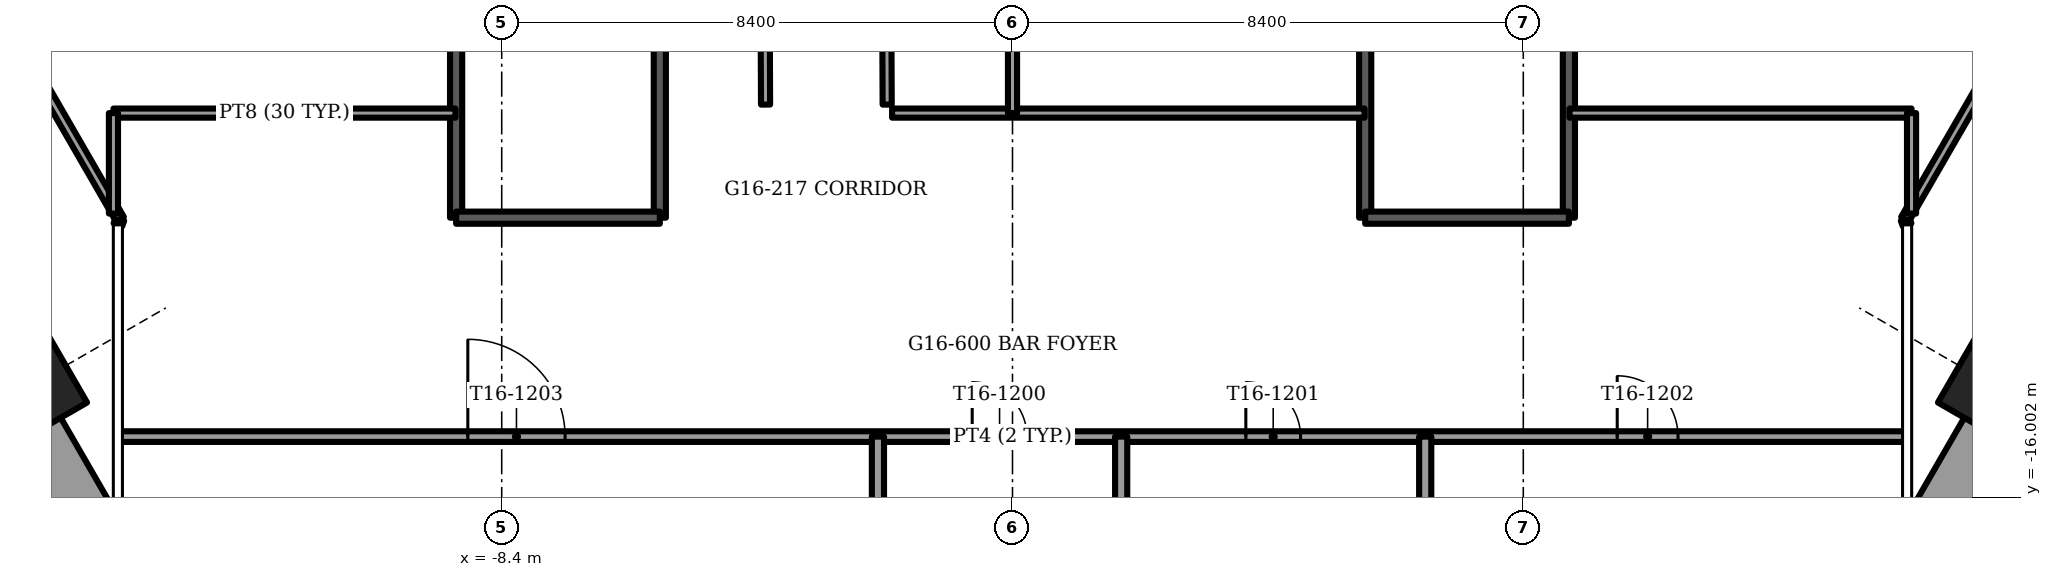
"""IFC4 building model, lengths in metres.
Left out: names, types, materials, properties, quantities, classifications, styles, units other than length and angle.
Written with IfcOpenShell. Run it as: python <this file> out.ifc"""

import sys

from ifc_helpers import new_model, si_unit, direction, frame, frame_2d, origin, origin_2d, place, context, subcontext, project, spatial, rectangle, extrude, element, fill, save


model = new_model("IFC4")
c1 = context("Model", 3, precision=1e-05, world=origin(), true_north=direction((0.0, 1.0)))
c2 = subcontext(c1, "Body", "Model", "MODEL_VIEW")
j1 = project(units=[si_unit("LENGTHUNIT", "METRE"), si_unit("PLANEANGLEUNIT", "RADIAN")], contexts=[c1])
p1 = place(None, origin())
s1 = spatial("IfcSite", under=j1, at=p1, CompositionType="ELEMENT")
p2 = place(p1, origin())
s2 = spatial("IfcBuilding", under=s1, at=p2, CompositionType="ELEMENT")
p3 = place(p2, frame((0.0, 0.0, 65.5)))
s3 = spatial("IfcBuildingStorey", under=s2, at=p3, CompositionType="ELEMENT", Elevation=65.5)
for number, where, z_axis, x_axis in (
    (1, (-16.175, -14.183, -1.2), (0.0, 0.0, 1.0), (-0.5, 0.866, 0.0)),
    (2, (16.175, -14.183, -1.2), (0.0, 0.0, 1.0), (-0.5, -0.866, 0.0)),
):
    element("IfcColumn", number, at=place(p3, frame(where, z_axis=z_axis, x_axis=x_axis)), inside=s3, PredefinedType="COLUMN", context=c2, shape_type="SweptSolid", body=[
        extrude(rectangle(XDim=1.4, YDim=1.4, at=origin_2d()), origin(), (0.0, 0.0, 1.0), 3.75),
    ])
for number, where, z_axis, x_axis in (
    (3, (-16.057, -14.889, 0.0), (0.0, 0.0, 1.0), (0.5, -0.866, 0.0)),
    (4, (13.177, -19.876, 0.0), (0.0, 0.0, 1.0), (0.5, 0.866, 0.0)),
):
    element("IfcWall", number, at=place(p3, frame(where, z_axis=z_axis, x_axis=x_axis)), inside=s3, PredefinedType="PARAPET", context=c2, shape_type="SweptSolid", body=[
        extrude(rectangle(XDim=5.759, YDim=0.9, at=frame_2d((2.879, 0.0))), origin(), (0.0, 0.0, 1.0), 1.1),
    ])
p4 = place(p3, frame((-20.496, -1.351, 0.0), z_axis=(0.0, 0.0, 1.0), x_axis=(0.500010091595, -0.866019577321, 0.0)))
e5 = element("IfcWall", 5, at=p4, inside=s3, PredefinedType="SOLIDWALL", context=c2, shape_type="SweptSolid", body=[
    extrude(rectangle(XDim=11.633, YDim=0.15, at=frame_2d((5.816, 0.0))), origin(), (0.0, 0.0, 1.0), 3.45),
])
p5 = place(p4, frame((0.978, 0.0, 0.15)))
e6 = element("IfcOpeningElement", 6, at=p5, cuts=e5, PredefinedType="OPENING", context=c2, shape_type="SweptSolid", body=[
    extrude(rectangle(XDim=0.9, YDim=2.2, at=frame_2d((0.45, 1.1))), frame((0.0, 0.075, 0.0), z_axis=(0.0, -1.0, 0.0), x_axis=(1.0, 0.0, 0.0)), (0.0, 0.0, 1.0), 0.15),
])
p6 = place(p4, frame((3.078, 0.0, 0.15)))
e7 = element("IfcOpeningElement", 7, at=p6, cuts=e5, PredefinedType="OPENING", context=c2, shape_type="SweptSolid", body=[
    extrude(rectangle(XDim=1.5, YDim=2.2, at=frame_2d((0.75, 1.1))), frame((0.0, 0.075, 0.0), z_axis=(0.0, -1.0, 0.0), x_axis=(1.0, 0.0, 0.0)), (0.0, 0.0, 1.0), 0.15),
])
p7 = place(p4, frame((6.501, 0.0, 0.15)))
e8 = element("IfcOpeningElement", 8, at=p7, cuts=e5, PredefinedType="OPENING", context=c2, shape_type="SweptSolid", body=[
    extrude(rectangle(XDim=1.8, YDim=2.2, at=frame_2d((0.9, 1.1))), frame((0.0, 0.075, 0.0), z_axis=(0.0, -1.0, 0.0), x_axis=(1.0, 0.0, 0.0)), (0.0, 0.0, 1.0), 0.15),
])
p8 = place(p3, frame((14.679, -11.425, 0.0), z_axis=(0.0, 0.0, 1.0), x_axis=(0.500010091595, 0.866019577321, 0.0)))
e9 = element("IfcWall", 9, at=p8, inside=s3, PredefinedType="SOLIDWALL", context=c2, shape_type="SweptSolid", body=[
    extrude(rectangle(XDim=11.633, YDim=0.15, at=frame_2d((5.816, 0.0))), origin(), (0.0, 0.0, 1.0), 3.45),
])
p9 = place(p8, frame((3.632, 0.0, 0.15)))
e10 = element("IfcOpeningElement", 10, at=p9, cuts=e9, PredefinedType="OPENING", context=c2, shape_type="SweptSolid", body=[
    extrude(rectangle(XDim=1.5, YDim=2.2, at=frame_2d((0.75, 1.1))), frame((0.0, 0.075, 0.0), z_axis=(0.0, -1.0, 0.0), x_axis=(1.0, 0.0, 0.0)), (0.0, 0.0, 1.0), 0.15),
])
p10 = place(p8, frame((9.296, 0.0, 0.15)))
e11 = element("IfcOpeningElement", 11, at=p10, cuts=e9, PredefinedType="OPENING", context=c2, shape_type="SweptSolid", body=[
    extrude(rectangle(XDim=0.9, YDim=2.2, at=frame_2d((0.45, 1.1))), frame((0.0, 0.075, 0.0), z_axis=(0.0, -1.0, 0.0), x_axis=(1.0, 0.0, 0.0)), (0.0, 0.0, 1.0), 0.15),
])
p11 = place(p8, frame((7.096, 0.0, 0.15)))
e12 = element("IfcOpeningElement", 12, at=p11, cuts=e9, PredefinedType="OPENING", context=c2, shape_type="SweptSolid", body=[
    extrude(rectangle(XDim=1.5, YDim=2.2, at=frame_2d((0.75, 1.1))), frame((0.0, 0.075, 0.0), z_axis=(0.0, -1.0, 0.0), x_axis=(1.0, 0.0, 0.0)), (0.0, 0.0, 1.0), 0.15),
])
for number, where, z_axis, x_axis in (
    (13, (-14.679, -11.425, 0.0), (0.0, 0.0, 1.0), (-0.339, -0.941, 0.0)),
    (14, (14.679, -11.425, 0.0), (0.0, 0.0, 1.0), (0.339, -0.941, 0.0)),
):
    element("IfcWall", number, at=place(p3, frame(where, z_axis=z_axis, x_axis=x_axis)), inside=s3, PredefinedType="SOLIDWALL", context=c2, shape_type="SweptSolid", body=[
        extrude(rectangle(XDim=0.098, YDim=0.15, at=frame_2d((0.049, 0.0))), origin(), (0.0, 0.0, 1.0), 3.45),
    ])
for number, where, z_axis, x_axis in (
    (15, (5.8, -3.7, -0.3), (0.0, 0.0, 1.0), (0.0, -1.0, 0.0)),
    (16, (9.15, -3.7, -0.3), (0.0, 0.0, 1.0), (0.0, -1.0, 0.0)),
):
    element("IfcWall", number, at=place(p3, frame(where, z_axis=z_axis, x_axis=x_axis)), inside=s3, PredefinedType="SOLIDWALL", context=c2, shape_type="SweptSolid", body=[
        extrude(rectangle(XDim=7.7, YDim=0.2, at=frame_2d((3.85, 0.0))), origin(), (0.0, 0.0, 1.0), 3.75),
    ])
p12 = place(p3, frame((5.8, -11.4, -0.3), z_axis=(0.0, 0.0, 1.0), x_axis=(1.0, 0.0, 0.0)))
e17 = element("IfcWall", 17, at=p12, inside=s3, PredefinedType="SOLIDWALL", context=c2, shape_type="SweptSolid", body=[
    extrude(rectangle(XDim=3.35, YDim=0.2, at=frame_2d((1.675, 0.0))), origin(), (0.0, 0.0, 1.0), 3.75),
])
for number, where, z_axis, x_axis in (
    (18, (-9.15, -3.7, -0.3), (0.0, 0.0, 1.0), (0.0, -1.0, 0.0)),
    (19, (-5.8, -3.7, -0.3), (0.0, 0.0, 1.0), (0.0, -1.0, 0.0)),
):
    element("IfcWall", number, at=place(p3, frame(where, z_axis=z_axis, x_axis=x_axis)), inside=s3, PredefinedType="SOLIDWALL", context=c2, shape_type="SweptSolid", body=[
        extrude(rectangle(XDim=7.7, YDim=0.2, at=frame_2d((3.85, 0.0))), origin(), (0.0, 0.0, 1.0), 3.75),
    ])
p13 = place(p3, frame((-9.15, -11.4, -0.3), z_axis=(0.0, 0.0, 1.0), x_axis=(1.0, 0.0, 0.0)))
e20 = element("IfcWall", 20, at=p13, inside=s3, PredefinedType="SOLIDWALL", context=c2, shape_type="SweptSolid", body=[
    extrude(rectangle(XDim=3.35, YDim=0.2, at=frame_2d((1.675, 0.0))), origin(), (0.0, 0.0, 1.0), 3.75),
])
p14 = place(p3, frame((-14.785, -9.68, 0.0), z_axis=(0.0, 0.0, 1.0), x_axis=(1.0, 0.0, 0.0)))
e21 = element("IfcWall", 21, at=p14, inside=s3, PredefinedType="PARTITIONING", context=c2, shape_type="SweptSolid", body=[
    extrude(rectangle(XDim=5.625, YDim=0.15, at=frame_2d((2.812, 0.0))), origin(), (0.0, 0.0, 1.0), 3.45),
])
p15 = place(p3, frame((-1.98, -9.68, 0.0), z_axis=(0.0, 0.0, 1.0), x_axis=(1.0, 0.0, 0.0)))
e22 = element("IfcWall", 22, at=p15, inside=s3, PredefinedType="PARTITIONING", context=c2, shape_type="SweptSolid", body=[
    extrude(rectangle(XDim=7.77, YDim=0.15, at=frame_2d((3.885, 0.0))), origin(), (0.0, 0.0, 1.0), 3.45),
])
p16 = place(p3, frame((9.16, -9.68, 0.0), z_axis=(0.0, 0.0, 1.0), x_axis=(1.0, 0.0, 0.0)))
e23 = element("IfcWall", 23, at=p16, inside=s3, PredefinedType="PARTITIONING", context=c2, shape_type="SweptSolid", body=[
    extrude(rectangle(XDim=5.625, YDim=0.15, at=frame_2d((2.812, 0.0))), origin(), (0.0, 0.0, 1.0), 3.45),
])
p17 = place(p3, frame((14.785, -11.332, 0.0), z_axis=(0.0, 0.0, 1.0), x_axis=(0.0, 1.0, 0.0)))
e24 = element("IfcWall", 24, at=p17, inside=s3, PredefinedType="PARTITIONING", context=c2, shape_type="SweptSolid", body=[
    extrude(rectangle(XDim=1.652, YDim=0.15, at=frame_2d((0.826, 0.0))), origin(), (0.0, 0.0, 1.0), 3.45),
])
p18 = place(p3, frame((0.0, -9.68, 0.0), z_axis=(0.0, 0.0, 1.0), x_axis=(0.0, 1.0, 0.0)))
e25 = element("IfcWall", 25, at=p18, inside=s3, PredefinedType="PARTITIONING", context=c2, shape_type="SweptSolid", body=[
    extrude(rectangle(XDim=5.98, YDim=0.15, at=frame_2d((2.99, 0.0))), origin(), (0.0, 0.0, 1.0), 3.45),
])
p19 = place(p3, frame((-14.785, -11.332, 0.0), z_axis=(0.0, 0.0, 1.0), x_axis=(0.0, 1.0, 0.0)))
e26 = element("IfcWall", 26, at=p19, inside=s3, PredefinedType="PARTITIONING", context=c2, shape_type="SweptSolid", body=[
    extrude(rectangle(XDim=1.652, YDim=0.15, at=frame_2d((0.826, 0.0))), origin(), (0.0, 0.0, 1.0), 3.45),
])
p20 = place(p3, frame((-2.061, -9.54, 0.0), z_axis=(0.0, 0.0, 1.0), x_axis=(-0.004096784315, 0.999991608144, 0.0)))
e27 = element("IfcWall", 27, at=p20, inside=s3, PredefinedType="PARTITIONING", context=c2, shape_type="SweptSolid", body=[
    extrude(rectangle(XDim=5.84, YDim=0.15, at=frame_2d((2.92, 0.0))), origin(), (0.0, 0.0, 1.0), 3.45),
])
p21 = place(p3, frame((-4.061, -9.54, 0.0), z_axis=(0.0, 0.0, 1.0), x_axis=(-0.004100383939, 0.99999159339, 0.0)))
e28 = element("IfcWall", 28, at=p21, inside=s3, PredefinedType="PARTITIONING", context=c2, shape_type="SweptSolid", body=[
    extrude(rectangle(XDim=5.835, YDim=0.15, at=frame_2d((2.917, 0.0))), origin(), (0.0, 0.0, 1.0), 3.45),
])
p22 = place(p3, frame((-14.693, -15.0, 0.0), z_axis=(0.0, 0.0, 1.0), x_axis=(1.0, 0.0, 0.0)))
e29 = element("IfcWall", 29, at=p22, inside=s3, PredefinedType="PARTITIONING", context=c2, shape_type="SweptSolid", body=[
    extrude(rectangle(XDim=29.386, YDim=0.175, at=frame_2d((14.693, 0.0))), origin(), (0.0, 0.0, 1.0), 3.45),
])
p23 = place(p22, frame((14.031, 0.0, 0.0)))
e30 = element("IfcOpeningElement", 30, at=p23, cuts=e29, PredefinedType="OPENING", context=c2, shape_type="SweptSolid", body=[
    extrude(rectangle(XDim=0.9, YDim=2.1, at=frame_2d((0.45, 1.05))), frame((0.0, 0.087, 0.0), z_axis=(0.0, -1.0, 0.0), x_axis=(1.0, 0.0, 0.0)), (0.0, 0.0, 1.0), 0.175),
])
p24 = place(p22, frame((18.531, 0.0, 0.0)))
e31 = element("IfcOpeningElement", 31, at=p24, cuts=e29, PredefinedType="OPENING", context=c2, shape_type="SweptSolid", body=[
    extrude(rectangle(XDim=0.9, YDim=2.1, at=frame_2d((0.45, 1.05))), frame((0.0, 0.087, 0.0), z_axis=(0.0, -1.0, 0.0), x_axis=(1.0, 0.0, 0.0)), (0.0, 0.0, 1.0), 0.175),
])
p25 = place(p22, frame((24.638, 0.0, 0.0)))
e32 = element("IfcOpeningElement", 32, at=p25, cuts=e29, PredefinedType="OPENING", context=c2, shape_type="SweptSolid", body=[
    extrude(rectangle(XDim=1.0, YDim=2.1, at=frame_2d((0.5, 1.05))), frame((0.0, 0.087, 0.0), z_axis=(0.0, -1.0, 0.0), x_axis=(1.0, 0.0, 0.0)), (0.0, 0.0, 1.0), 0.175),
])
p26 = place(p22, frame((5.736, 0.0, 0.0)))
e33 = element("IfcOpeningElement", 33, at=p26, cuts=e29, PredefinedType="OPENING", context=c2, shape_type="SweptSolid", body=[
    extrude(rectangle(XDim=1.6, YDim=2.1, at=frame_2d((0.8, 1.05))), frame((0.0, 0.087, 0.0), z_axis=(0.0, -1.0, 0.0), x_axis=(1.0, 0.0, 0.0)), (0.0, 0.0, 1.0), 0.175),
])
p27 = place(p3, frame((-2.213, -32.371, 0.0), z_axis=(0.0, 0.0, 1.0), x_axis=(0.0, 1.0, 0.0)))
e34 = element("IfcWall", 34, at=p27, inside=s3, PredefinedType="PARTITIONING", context=c2, shape_type="SweptSolid", body=[
    extrude(rectangle(XDim=17.371, YDim=0.2, at=frame_2d((8.686, 0.0))), origin(), (0.0, 0.0, 1.0), 2.828),
])
p28 = place(p27, frame((4.691, 0.0, 0.0)))
e35 = element("IfcOpeningElement", 35, at=p28, cuts=e34, PredefinedType="OPENING", context=c2, shape_type="SweptSolid", body=[
    extrude(rectangle(XDim=1.6, YDim=2.1, at=frame_2d((0.8, 1.05))), frame((0.0, 0.1, 0.0), z_axis=(0.0, -1.0, 0.0), x_axis=(1.0, 0.0, 0.0)), (0.0, 0.0, 1.0), 0.2),
])
for number, where, z_axis, x_axis in (
    (36, (1.787, -21.5, 0.0), (0.0, 0.0, 1.0), (0.0, 1.0, 0.0)),
    (37, (6.787, -21.5, 0.0), (0.0, 0.0, 1.0), (0.0, 1.0, 0.0)),
):
    element("IfcWall", number, at=place(p3, frame(where, z_axis=z_axis, x_axis=x_axis)), inside=s3, PredefinedType="PARTITIONING", context=c2, shape_type="SweptSolid", body=[
        extrude(rectangle(XDim=6.5, YDim=0.2, at=frame_2d((3.25, 0.0))), origin(), (0.0, 0.0, 1.0), 2.828),
    ])
p29 = place(p23, origin())
e38 = element("IfcDoor", 38, at=p29, inside=s3, OperationType="SINGLE_SWING_RIGHT", PredefinedType="DOOR", context=c2, shape_type="SweptSolid", body=[
    extrude(rectangle(XDim=0.9, YDim=2.1, at=frame_2d((0.45, 1.05))), frame((0.0, 0.025, 0.0), z_axis=(0.0, -1.0, 0.0), x_axis=(1.0, 0.0, 0.0)), (0.0, 0.0, 1.0), 0.05),
])
fill(e30, e38)
p30 = place(p24, origin())
e39 = element("IfcDoor", 39, at=p30, inside=s3, OperationType="SINGLE_SWING_LEFT", PredefinedType="DOOR", context=c2, shape_type="SweptSolid", body=[
    extrude(rectangle(XDim=0.9, YDim=2.1, at=frame_2d((0.45, 1.05))), frame((0.0, 0.025, 0.0), z_axis=(0.0, -1.0, 0.0), x_axis=(1.0, 0.0, 0.0)), (0.0, 0.0, 1.0), 0.05),
])
fill(e31, e39)
p31 = place(p25, origin())
e40 = element("IfcDoor", 40, at=p31, inside=s3, OperationType="SINGLE_SWING_RIGHT", PredefinedType="DOOR", context=c2, shape_type="SweptSolid", body=[
    extrude(rectangle(XDim=1.0, YDim=2.1, at=frame_2d((0.5, 1.05))), frame((0.0, 0.025, 0.0), z_axis=(0.0, -1.0, 0.0), x_axis=(1.0, 0.0, 0.0)), (0.0, 0.0, 1.0), 0.05),
])
fill(e32, e40)
p32 = place(p26, origin())
e41 = element("IfcDoor", 41, at=p32, inside=s3, OperationType="DOUBLE_DOOR_SINGLE_SWING", PredefinedType="DOOR", context=c2, shape_type="SweptSolid", body=[
    extrude(rectangle(XDim=1.6, YDim=2.1, at=frame_2d((0.8, 1.05))), frame((0.0, 0.025, 0.0), z_axis=(0.0, -1.0, 0.0), x_axis=(1.0, 0.0, 0.0)), (0.0, 0.0, 1.0), 0.05),
])
fill(e33, e41)
save(model, sys.argv[1])
